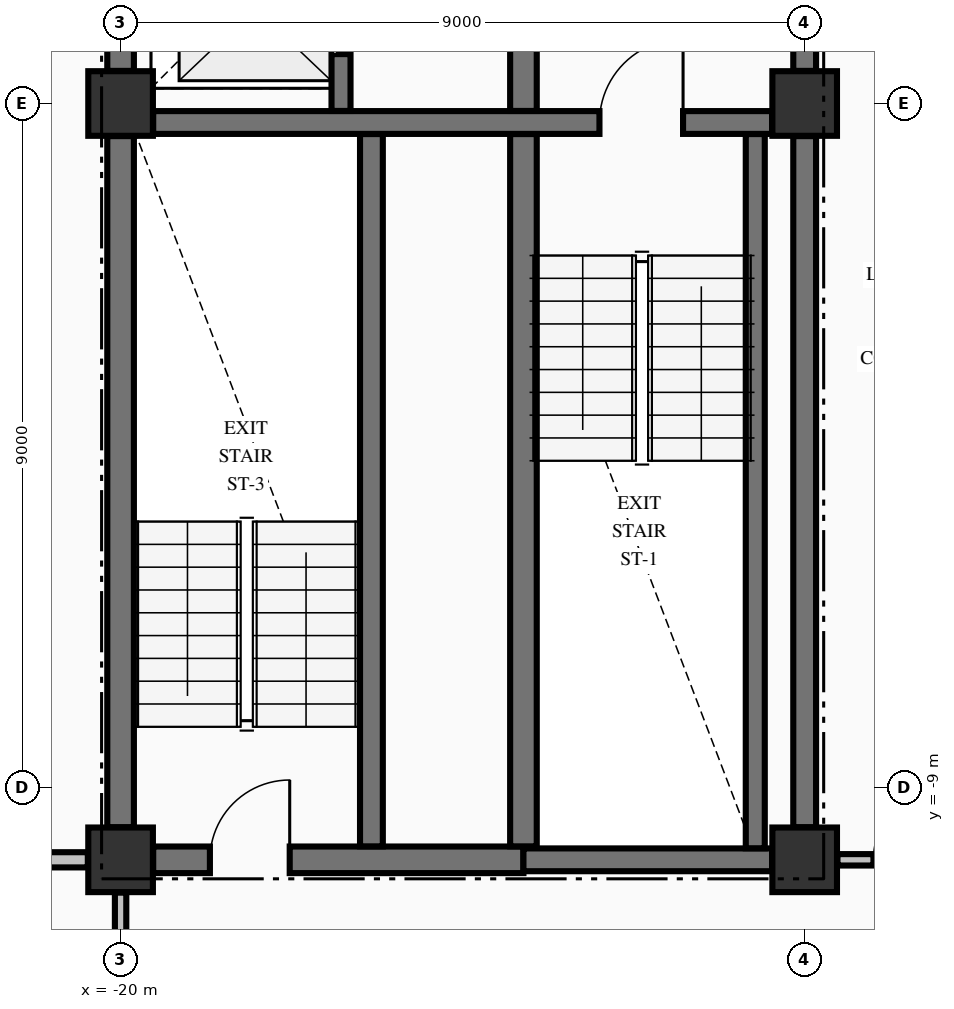
"""IFC4 building model, lengths in metres.
Left out: names, types, materials, properties, quantities, classifications, styles, units other than length and angle.
Written with IfcOpenShell. Run it as: python <this file> out.ifc"""

import sys

from ifc_helpers import new_model, si_unit, direction, frame, frame_2d, origin, origin_2d, place, context, subcontext, project, spatial, rectangle, extrude, element, fill, save


model = new_model("IFC4")
c1 = context("Model", 3, precision=1e-05, world=origin(), true_north=direction((0.0, 1.0)))
c2 = subcontext(c1, "Body", "Model", "MODEL_VIEW")
j1 = project(units=[si_unit("LENGTHUNIT", "METRE"), si_unit("PLANEANGLEUNIT", "RADIAN")], contexts=[c1])
p1 = place(None, origin())
s1 = spatial("IfcSite", under=j1, at=p1, CompositionType="ELEMENT")
p2 = place(p1, origin())
s2 = spatial("IfcBuilding", under=s1, at=p2, CompositionType="ELEMENT")
p3 = place(p2, frame((0.0, 0.0, 208.46)))
s3 = spatial("IfcBuildingStorey", under=s2, at=p3, CompositionType="ELEMENT", Elevation=208.46)
for number, where, z_axis, x_axis in (
    (1, (-20.0, -9.95, -0.25), (0.0, 0.0, 1.0), (1.0, 0.0, 0.0)),
    (2, (-11.0, -9.95, -0.25), (0.0, 0.0, 1.0), (1.0, 0.0, 0.0)),
    (3, (-11.0, 0.0, -0.25), (0.0, 0.0, 1.0), (1.0, 0.0, 0.0)),
    (4, (-20.0, 0.0, -0.25), (0.0, 0.0, 1.0), (1.0, 0.0, 0.0)),
):
    element("IfcColumn", number, at=place(p3, frame(where, z_axis=z_axis, x_axis=x_axis)), inside=s3, PredefinedType="COLUMN", context=c2, shape_type="SweptSolid", body=[
        extrude(rectangle(XDim=0.85, YDim=0.85, at=origin_2d()), origin(), (0.0, 0.0, 1.0), 3.325),
    ])
p4 = place(p3, frame((-19.571, -9.95, 0.0), z_axis=(0.0, 0.0, 1.0), x_axis=(1.0, 0.0, 0.0)))
e5 = element("IfcWall", 5, at=p4, inside=s3, PredefinedType="SHEAR", context=c2, shape_type="SweptSolid", body=[
    extrude(rectangle(XDim=4.871, YDim=0.35, at=frame_2d((2.436, 0.0))), origin(), (0.0, 0.0, 1.0), 3.075),
])
p5 = place(p4, frame((0.746, 0.0, 0.0)))
e6 = element("IfcOpeningElement", 6, at=p5, cuts=e5, PredefinedType="OPENING", context=c2, shape_type="SweptSolid", body=[
    extrude(rectangle(XDim=1.05, YDim=2.15, at=frame_2d((0.525, 1.075))), frame((0.0, 0.185, 0.0), z_axis=(0.0, -1.0, 0.0), x_axis=(1.0, 0.0, 0.0)), (0.0, 0.0, 1.0), 0.37),
])
p6 = place(p3, frame((-14.7, -9.95, 0.0), z_axis=(0.0, 0.0, 1.0), x_axis=(1.0, 0.0, 0.0)))
e7 = element("IfcWall", 7, at=p6, inside=s3, PredefinedType="SHEAR", context=c2, shape_type="SweptSolid", body=[
    extrude(rectangle(XDim=3.271, YDim=0.3, at=frame_2d((1.635, 0.0))), origin(), (0.0, 0.0, 1.0), 3.075),
])
p7 = place(p3, frame((-19.571, -0.25, 0.0), z_axis=(0.0, 0.0, 1.0), x_axis=(1.0, 0.0, 0.0)))
e8 = element("IfcWall", 8, at=p7, inside=s3, PredefinedType="SHEAR", context=c2, shape_type="SweptSolid", body=[
    extrude(rectangle(XDim=8.142, YDim=0.3, at=frame_2d((4.071, 0.0))), origin(), (0.0, 0.0, 1.0), 3.075),
])
p8 = place(p7, frame((5.871, 0.0, 0.0)))
e9 = element("IfcOpeningElement", 9, at=p8, cuts=e8, PredefinedType="OPENING", context=c2, shape_type="SweptSolid", body=[
    extrude(rectangle(XDim=1.1, YDim=2.15, at=frame_2d((0.55, 1.075))), frame((0.0, 0.16, 0.0), z_axis=(0.0, -1.0, 0.0), x_axis=(1.0, 0.0, 0.0)), (0.0, 0.0, 1.0), 0.32),
])
p9 = place(p3, frame((-26.835, -9.95, 0.0), z_axis=(0.0, 0.0, 1.0), x_axis=(1.0, 0.0, 0.0)))
e10 = element("IfcWall", 10, at=p9, inside=s3, PredefinedType="PARTITIONING", context=c2, shape_type="SweptSolid", body=[
    extrude(rectangle(XDim=6.404, YDim=0.2, at=frame_2d((3.202, 0.0))), origin(), (0.0, 0.0, 1.0), 3.075),
])
p10 = place(p3, frame((-10.569, -9.95, 0.0), z_axis=(0.0, 0.0, 1.0), x_axis=(1.0, 0.0, 0.0)))
e11 = element("IfcWall", 11, at=p10, inside=s3, PredefinedType="PARTITIONING", context=c2, shape_type="SweptSolid", body=[
    extrude(rectangle(XDim=21.138, YDim=0.15, at=frame_2d((10.569, 0.0))), origin(), (0.0, 0.0, 1.0), 3.075),
])
p11 = place(p10, frame((0.474, 0.0, 0.0)))
e12 = element("IfcOpeningElement", 12, at=p11, cuts=e11, PredefinedType="OPENING", context=c2, shape_type="SweptSolid", body=[
    extrude(rectangle(XDim=1.05, YDim=2.15, at=frame_2d((0.525, 1.075))), frame((0.0, 0.085, 0.0), z_axis=(0.0, -1.0, 0.0), x_axis=(1.0, 0.0, 0.0)), (0.0, 0.0, 1.0), 0.17),
])
p12 = place(p10, frame((19.614, 0.0, 0.0)))
e13 = element("IfcOpeningElement", 13, at=p12, cuts=e11, PredefinedType="OPENING", context=c2, shape_type="SweptSolid", body=[
    extrude(rectangle(XDim=1.05, YDim=2.15, at=frame_2d((0.525, 1.075))), frame((0.0, 0.085, 0.0), z_axis=(0.0, -1.0, 0.0), x_axis=(1.0, 0.0, 0.0)), (0.0, 0.0, 1.0), 0.17),
])
p13 = place(p10, frame((13.574, 0.0, 0.0)))
e14 = element("IfcOpeningElement", 14, at=p13, cuts=e11, PredefinedType="OPENING", context=c2, shape_type="SweptSolid", body=[
    extrude(rectangle(XDim=0.95, YDim=2.15, at=frame_2d((0.475, 1.075))), frame((0.0, 0.085, 0.0), z_axis=(0.0, -1.0, 0.0), x_axis=(1.0, 0.0, 0.0)), (0.0, 0.0, 1.0), 0.17),
])
p14 = place(p3, frame((-20.0, -9.521, 0.0), z_axis=(0.0, 0.0, 1.0), x_axis=(0.0, 1.0, 0.0)))
e15 = element("IfcWall", 15, at=p14, inside=s3, PredefinedType="SHEAR", context=c2, shape_type="SweptSolid", body=[
    extrude(rectangle(XDim=9.092, YDim=0.35, at=frame_2d((4.546, 0.0))), origin(), (0.0, 0.0, 1.0), 3.075),
])
p15 = place(p3, frame((-20.0, 0.429, 0.0), z_axis=(0.0, 0.0, 1.0), x_axis=(0.0, 1.0, 0.0)))
e16 = element("IfcWall", 16, at=p15, inside=s3, PredefinedType="SHEAR", context=c2, shape_type="SweptSolid", body=[
    extrude(rectangle(XDim=2.094, YDim=0.35, at=frame_2d((1.047, 0.0))), origin(), (0.0, 0.0, 1.0), 3.075),
])
p16 = place(p3, frame((-17.1, -0.098, 0.0), z_axis=(0.0, 0.0, 1.0), x_axis=(0.0, 1.0, 0.0)))
e17 = element("IfcWall", 17, at=p16, inside=s3, PredefinedType="SOLIDWALL", context=c2, shape_type="SweptSolid", body=[
    extrude(rectangle(XDim=2.621, YDim=0.25, at=frame_2d((1.311, 0.0))), origin(), (0.0, 0.0, 1.0), 3.075),
])
p17 = place(p16, frame((0.748, 0.0, 0.0)))
e18 = element("IfcOpeningElement", 18, at=p17, cuts=e17, PredefinedType="OPENING", context=c2, shape_type="SweptSolid", body=[
    extrude(rectangle(XDim=1.1, YDim=2.2, at=frame_2d((0.55, 1.1))), frame((0.0, 0.135, 0.0), z_axis=(0.0, -1.0, 0.0), x_axis=(1.0, 0.0, 0.0)), (0.0, 0.0, 1.0), 0.27),
])
p18 = place(p3, frame((-16.7, -9.773, 0.0), z_axis=(0.0, 0.0, 1.0), x_axis=(0.0, 1.0, 0.0)))
e19 = element("IfcWall", 19, at=p18, inside=s3, PredefinedType="SHEAR", context=c2, shape_type="SweptSolid", body=[
    extrude(rectangle(XDim=9.371, YDim=0.3, at=frame_2d((4.686, 0.0))), origin(), (0.0, 0.0, 1.0), 3.075),
])
p19 = place(p3, frame((-14.7, -9.773, 0.0), z_axis=(0.0, 0.0, 1.0), x_axis=(0.0, 1.0, 0.0)))
e20 = element("IfcWall", 20, at=p19, inside=s3, PredefinedType="SHEAR", context=c2, shape_type="SweptSolid", body=[
    extrude(rectangle(XDim=9.371, YDim=0.35, at=frame_2d((4.686, 0.0))), origin(), (0.0, 0.0, 1.0), 3.075),
])
p20 = place(p3, frame((-14.7, -0.098, 0.0), z_axis=(0.0, 0.0, 1.0), x_axis=(0.0, 1.0, 0.0)))
e21 = element("IfcWall", 21, at=p20, inside=s3, PredefinedType="SHEAR", context=c2, shape_type="SweptSolid", body=[
    extrude(rectangle(XDim=2.846, YDim=0.35, at=frame_2d((1.423, 0.0))), origin(), (0.0, 0.0, 1.0), 3.075),
])
p21 = place(p3, frame((-11.65, -9.798, 0.0), z_axis=(0.0, 0.0, 1.0), x_axis=(0.0, 1.0, 0.0)))
e22 = element("IfcWall", 22, at=p21, inside=s3, PredefinedType="SOLIDWALL", context=c2, shape_type="SweptSolid", body=[
    extrude(rectangle(XDim=9.396, YDim=0.25, at=frame_2d((4.698, 0.0))), origin(), (0.0, 0.0, 1.0), 3.075),
])
p22 = place(p3, frame((-11.0, -9.521, 0.0), z_axis=(0.0, 0.0, 1.0), x_axis=(0.0, 1.0, 0.0)))
e23 = element("IfcWall", 23, at=p22, inside=s3, PredefinedType="SHEAR", context=c2, shape_type="SweptSolid", body=[
    extrude(rectangle(XDim=9.092, YDim=0.3, at=frame_2d((4.546, 0.0))), origin(), (0.0, 0.0, 1.0), 3.075),
])
p23 = place(p3, frame((-11.0, 0.429, 0.0), z_axis=(0.0, 0.0, 1.0), x_axis=(0.0, 1.0, 0.0)))
e24 = element("IfcWall", 24, at=p23, inside=s3, PredefinedType="SHEAR", context=c2, shape_type="SweptSolid", body=[
    extrude(rectangle(XDim=2.319, YDim=0.3, at=frame_2d((1.16, 0.0))), origin(), (0.0, 0.0, 1.0), 3.075),
])
p24 = place(p23, frame((0.671, 0.0, 0.0)))
e25 = element("IfcOpeningElement", 25, at=p24, cuts=e24, PredefinedType="OPENING", context=c2, shape_type="SweptSolid", body=[
    extrude(rectangle(XDim=1.1, YDim=2.15, at=frame_2d((0.55, 1.075))), frame((0.0, 0.16, 0.0), z_axis=(0.0, -1.0, 0.0), x_axis=(1.0, 0.0, 0.0)), (0.0, 0.0, 1.0), 0.32),
])
p25 = place(p3, frame((-20.0, -12.997, 0.0), z_axis=(0.0, 0.0, 1.0), x_axis=(0.0, 1.0, 0.0)))
e26 = element("IfcWall", 26, at=p25, inside=s3, PredefinedType="PARTITIONING", context=c2, shape_type="SweptSolid", body=[
    extrude(rectangle(XDim=2.616, YDim=0.15, at=frame_2d((1.308, 0.0))), origin(), (0.0, 0.0, 1.0), 2.267),
])
p26 = place(p8, origin())
e27 = element("IfcDoor", 27, at=p26, inside=s3, OperationType="SINGLE_SWING_RIGHT", PredefinedType="DOOR", context=c2, shape_type="SweptSolid", body=[
    extrude(rectangle(XDim=1.1, YDim=2.15, at=frame_2d((0.55, 1.075))), frame((0.0, 0.025, 0.0), z_axis=(0.0, -1.0, 0.0), x_axis=(1.0, 0.0, 0.0)), (0.0, 0.0, 1.0), 0.05),
])
fill(e9, e27)
p27 = place(p5, origin())
e28 = element("IfcDoor", 28, at=p27, inside=s3, OperationType="SINGLE_SWING_RIGHT", PredefinedType="DOOR", context=c2, shape_type="SweptSolid", body=[
    extrude(rectangle(XDim=1.05, YDim=2.15, at=frame_2d((0.525, 1.075))), frame((0.0, 0.025, 0.0), z_axis=(0.0, -1.0, 0.0), x_axis=(1.0, 0.0, 0.0)), (0.0, 0.0, 1.0), 0.05),
])
fill(e6, e28)
p28 = place(p17, origin())
e29 = element("IfcDoor", 29, at=p28, inside=s3, OperationType="SLIDING_TO_LEFT", PredefinedType="DOOR", context=c2, shape_type="SweptSolid", body=[
    extrude(rectangle(XDim=1.1, YDim=2.2, at=frame_2d((0.55, 1.1))), frame((0.0, 0.025, 0.0), z_axis=(0.0, -1.0, 0.0), x_axis=(1.0, 0.0, 0.0)), (0.0, 0.0, 1.0), 0.05),
])
fill(e18, e29)
p29 = place(p11, origin())
e30 = element("IfcDoor", 30, at=p29, inside=s3, OperationType="SINGLE_SWING_RIGHT", PredefinedType="DOOR", context=c2, shape_type="SweptSolid", body=[
    extrude(rectangle(XDim=1.05, YDim=2.15, at=frame_2d((0.525, 1.075))), frame((0.0, 0.025, 0.0), z_axis=(0.0, -1.0, 0.0), x_axis=(1.0, 0.0, 0.0)), (0.0, 0.0, 1.0), 0.05),
])
fill(e12, e30)
save(model, sys.argv[1])
